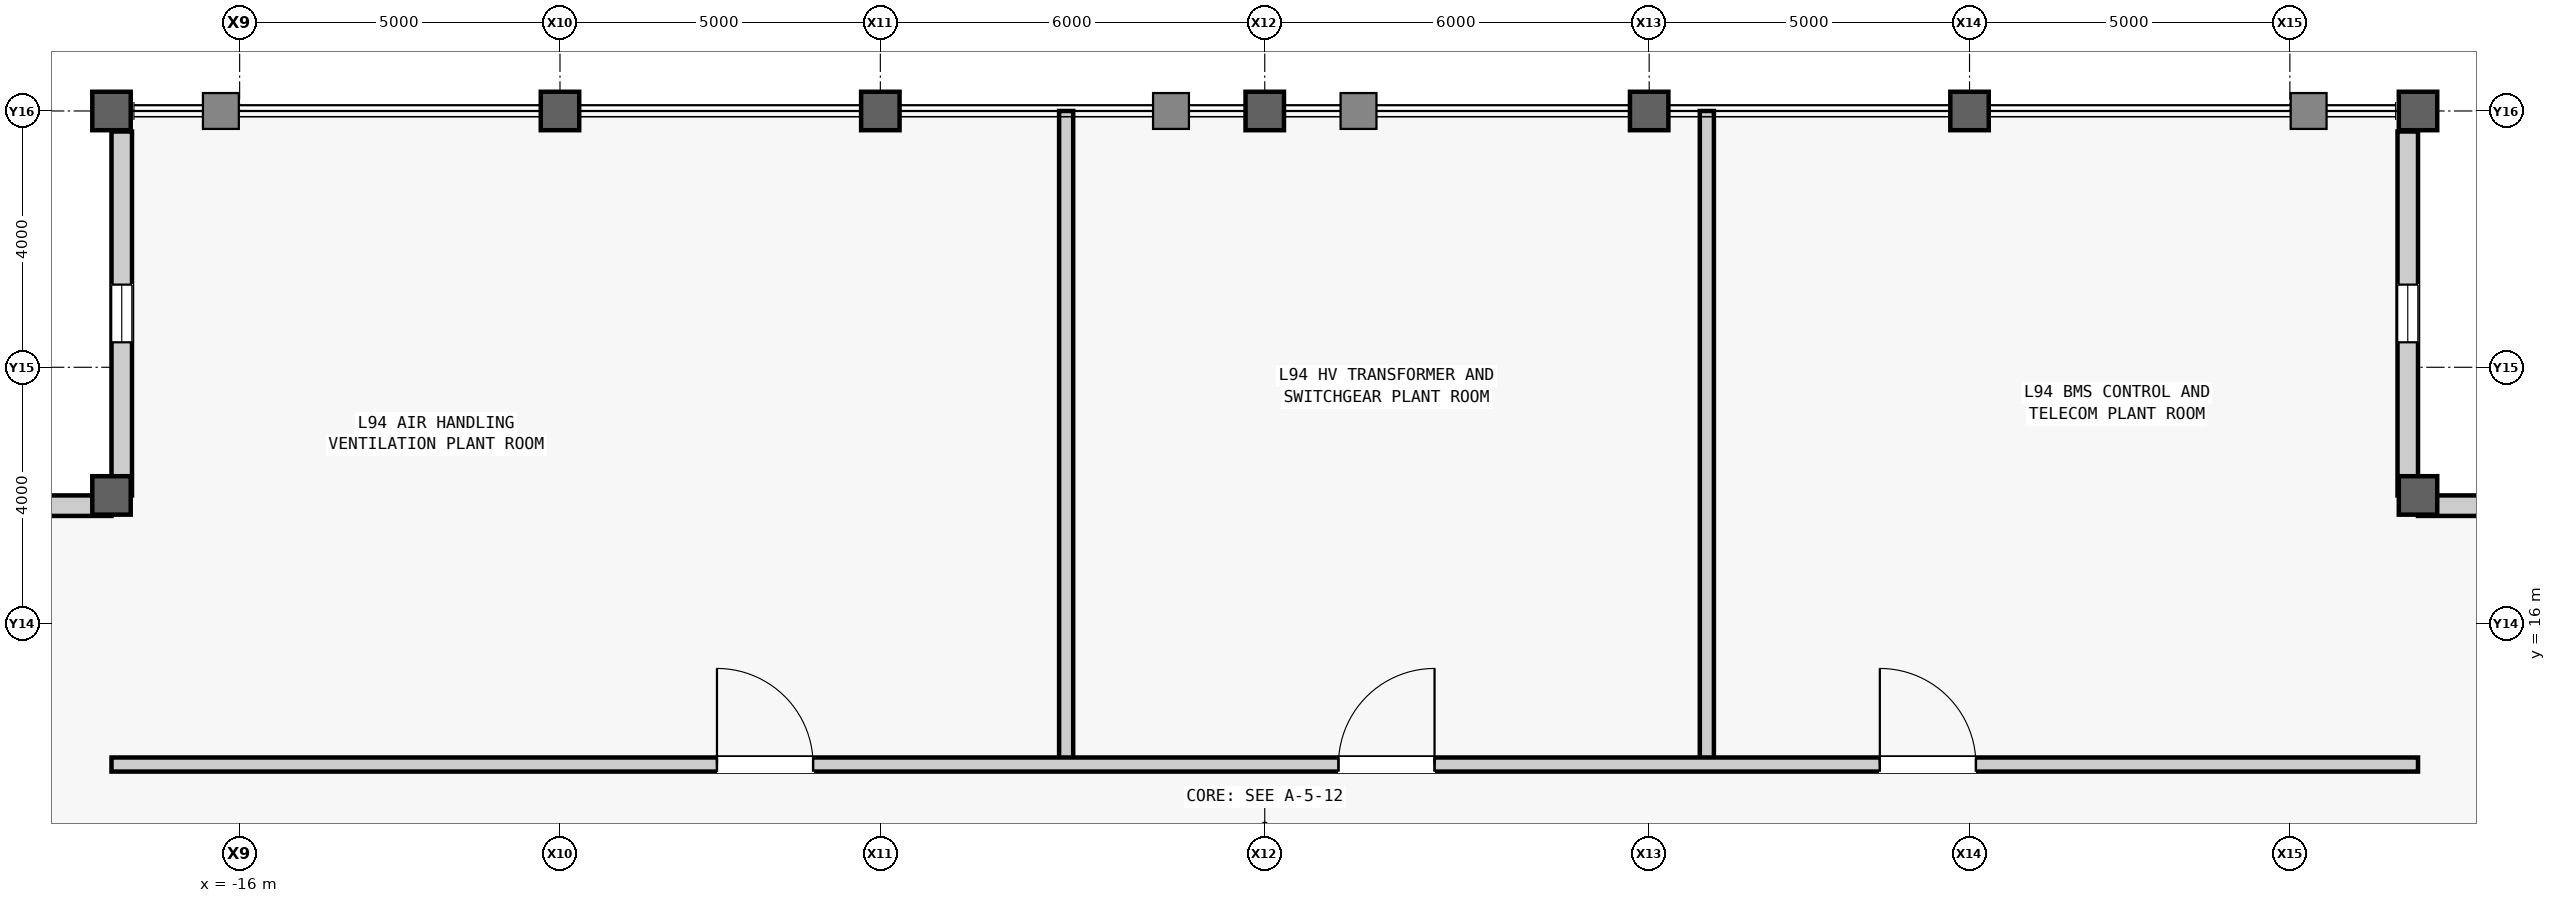
"""IFC4 building model, lengths in metres.
Left out: names, types, materials, properties, quantities, classifications, styles, units other than length and angle.
Written with IfcOpenShell. Run it as: python <this file> out.ifc"""

import sys

from ifc_helpers import new_model, si_unit, direction, frame, frame_2d, origin, origin_2d, place, context, subcontext, project, spatial, rectangle, hollow_rectangle, extrude, source, transform, mapped, element, fill, save


model = new_model("IFC4")
c1 = context("Model", 3, precision=1e-05, world=origin(), true_north=direction((0.0, 1.0)))
c2 = subcontext(c1, "Body", "Model", "MODEL_VIEW")
j1 = project(units=[si_unit("LENGTHUNIT", "METRE"), si_unit("PLANEANGLEUNIT", "RADIAN")], contexts=[c1])
p1 = place(None, origin())
s1 = spatial("IfcSite", under=j1, at=p1, CompositionType="ELEMENT")
p2 = place(p1, origin())
s2 = spatial("IfcBuilding", under=s1, at=p2, CompositionType="ELEMENT")
p3 = place(p2, frame((0.0, 0.0, 399.5)))
s3 = spatial("IfcBuildingStorey", under=s2, at=p3, CompositionType="ELEMENT", Elevation=399.5)
m1 = source(origin(), c2, "Body", "SweptSolid", [
    extrude(hollow_rectangle(XDim=0.6, YDim=0.6, WallThickness=0.035, at=origin_2d()), origin(), (0.0, 0.0, 1.0), 4.8),
])
for number, where, z_axis, x_axis in (
    (1, (-18.0, 18.0, 0.0), (0.0, 0.0, 1.0), (1.0, 0.0, 0.0)),
    (2, (-18.0, 24.0, 0.0), (0.0, 0.0, 1.0), (1.0, 0.0, 0.0)),
    (3, (-11.0, 24.0, 0.0), (0.0, 0.0, 1.0), (1.0, 0.0, 0.0)),
    (4, (-6.0, 24.0, 0.0), (0.0, 0.0, 1.0), (1.0, 0.0, 0.0)),
    (5, (0.0, 24.0, 0.0), (0.0, 0.0, 1.0), (1.0, 0.0, 0.0)),
    (6, (6.0, 24.0, 0.0), (0.0, 0.0, 1.0), (1.0, 0.0, 0.0)),
    (7, (11.0, 24.0, 0.0), (0.0, 0.0, 1.0), (1.0, 0.0, 0.0)),
    (8, (18.0, 18.0, 0.0), (0.0, 0.0, 1.0), (1.0, 0.0, 0.0)),
    (9, (18.0, 24.0, 0.0), (0.0, 0.0, 1.0), (1.0, 0.0, 0.0)),
):
    element("IfcColumn", number, at=place(p3, frame(where, z_axis=z_axis, x_axis=x_axis)), inside=s3, PredefinedType="COLUMN", context=c2, shape_type="MappedRepresentation", body=[
        mapped(m1, transform((0.0, 0.0, 0.0), scale=1.0)),
    ])
m2 = source(origin(), c2, "Body", "SweptSolid", [
    extrude(rectangle(XDim=5.68, YDim=0.32, at=frame_2d((2.84, 0.0))), origin(), (0.0, 0.0, 1.0), 3.951),
])
p4 = place(p3, frame((18.0, 17.84, 0.0), z_axis=(0.0, 0.0, 1.0), x_axis=(1.0, 0.0, 0.0)))
e10 = element("IfcWall", 10, at=p4, inside=s3, PredefinedType="STANDARD", context=c2, shape_type="MappedRepresentation", body=[
    mapped(m2, transform((0.0, 0.0, 0.0), scale=1.0)),
])
m3 = source(origin(), c2, "Body", "SweptSolid", [
    extrude(rectangle(XDim=0.9, YDim=2.4, at=frame_2d((0.45, 1.2))), frame((0.0, 0.17, 0.0), z_axis=(0.0, -1.0, 0.0), x_axis=(1.0, 0.0, 0.0)), (0.0, 0.0, 1.0), 0.34),
])
p5 = place(p4, frame((2.39, 0.0, 0.7)))
e11 = element("IfcOpeningElement", 11, at=p5, cuts=e10, PredefinedType="OPENING", context=c2, shape_type="MappedRepresentation", body=[
    mapped(m3, transform((0.0, 0.0, 0.0), scale=1.0)),
])
p6 = place(p3, frame((17.84, 18.0, 0.0), z_axis=(0.0, 0.0, 1.0), x_axis=(0.0, 1.0, 0.0)))
e12 = element("IfcWall", 12, at=p6, inside=s3, PredefinedType="STANDARD", context=c2, shape_type="MappedRepresentation", body=[
    mapped(m2, transform((0.0, 0.0, 0.0), scale=1.0)),
])
p7 = place(p6, frame((2.39, 0.0, 0.7)))
e13 = element("IfcOpeningElement", 13, at=p7, cuts=e12, PredefinedType="OPENING", context=c2, shape_type="MappedRepresentation", body=[
    mapped(m3, transform((0.0, 0.0, 0.0), scale=1.0)),
])
p8 = place(p3, frame((-17.84, 18.0, 0.0), z_axis=(0.0, 0.0, 1.0), x_axis=(0.0, 1.0, 0.0)))
e14 = element("IfcWall", 14, at=p8, inside=s3, PredefinedType="STANDARD", context=c2, shape_type="MappedRepresentation", body=[
    mapped(m2, transform((0.0, 0.0, 0.0), scale=1.0)),
])
p9 = place(p8, frame((2.39, 0.0, 0.7)))
e15 = element("IfcOpeningElement", 15, at=p9, cuts=e14, PredefinedType="OPENING", context=c2, shape_type="MappedRepresentation", body=[
    mapped(m3, transform((0.0, 0.0, 0.0), scale=1.0)),
])
p10 = place(p3, frame((-18.0, 17.84, 0.0), z_axis=(0.0, 0.0, 1.0), x_axis=(-1.0, 0.0, 0.0)))
e16 = element("IfcWall", 16, at=p10, inside=s3, PredefinedType="STANDARD", context=c2, shape_type="MappedRepresentation", body=[
    mapped(m2, transform((0.0, 0.0, 0.0), scale=1.0)),
])
p11 = place(p10, frame((2.39, 0.0, 0.7)))
e17 = element("IfcOpeningElement", 17, at=p11, cuts=e16, PredefinedType="OPENING", context=c2, shape_type="MappedRepresentation", body=[
    mapped(m3, transform((0.0, 0.0, 0.0), scale=1.0)),
])
m4 = source(origin(), c2, "Body", "SweptSolid", [
    extrude(rectangle(XDim=10.2, YDim=0.22, at=frame_2d((5.1, 0.0))), origin(), (0.0, 0.0, 1.0), 4.5),
])
for number, where, z_axis, x_axis in (
    (18, (-3.1, 13.8, 0.0), (0.0, 0.0, 1.0), (0.0, 1.0, 0.0)),
    (19, (6.9, 13.8, 0.0), (0.0, 0.0, 1.0), (0.0, 1.0, 0.0)),
):
    element("IfcWall", number, at=place(p3, frame(where, z_axis=z_axis, x_axis=x_axis)), inside=s3, PredefinedType="PARTITIONING", context=c2, shape_type="MappedRepresentation", body=[
        mapped(m4, transform((0.0, 0.0, 0.0), scale=1.0)),
    ])
m5 = source(origin(), c2, "Body", "SweptSolid", [
    extrude(rectangle(XDim=36.0, YDim=0.22, at=frame_2d((18.0, 0.0))), origin(), (0.0, 0.0, 1.0), 4.5),
])
p12 = place(p3, frame((-18.0, 13.8, 0.0), z_axis=(0.0, 0.0, 1.0), x_axis=(1.0, 0.0, 0.0)))
e20 = element("IfcWall", 20, at=p12, inside=s3, PredefinedType="PARTITIONING", context=c2, shape_type="MappedRepresentation", body=[
    mapped(m5, transform((0.0, 0.0, 0.0), scale=1.0)),
])
m6 = source(origin(), c2, "Body", "SweptSolid", [
    extrude(rectangle(XDim=1.5, YDim=2.3, at=frame_2d((0.75, 1.15))), frame((0.0, 0.12, 0.0), z_axis=(0.0, -1.0, 0.0), x_axis=(1.0, 0.0, 0.0)), (0.0, 0.0, 1.0), 0.24),
])
p13 = place(p12, frame((9.45, 0.0, 0.0)))
e21 = element("IfcOpeningElement", 21, at=p13, cuts=e20, PredefinedType="OPENING", context=c2, shape_type="MappedRepresentation", body=[
    mapped(m6, transform((0.0, 0.0, 0.0), scale=1.0)),
])
p14 = place(p12, frame((19.15, 0.0, 0.0)))
e22 = element("IfcOpeningElement", 22, at=p14, cuts=e20, PredefinedType="OPENING", context=c2, shape_type="MappedRepresentation", body=[
    mapped(m6, transform((0.0, 0.0, 0.0), scale=1.0)),
])
p15 = place(p12, frame((27.6, 0.0, 0.0)))
e23 = element("IfcOpeningElement", 23, at=p15, cuts=e20, PredefinedType="OPENING", context=c2, shape_type="MappedRepresentation", body=[
    mapped(m6, transform((0.0, 0.0, 0.0), scale=1.0)),
])
m7 = source(origin(), c2, "Body", "SweptSolid", [
    extrude(rectangle(XDim=0.9, YDim=2.4, at=frame_2d((0.45, 1.2))), frame((0.0, 0.03, 0.0), z_axis=(0.0, -1.0, 0.0), x_axis=(1.0, 0.0, 0.0)), (0.0, 0.0, 1.0), 0.06),
])
p16 = place(p7, origin())
e24 = element("IfcWindow", 24, at=p16, inside=s3, PartitioningType="SINGLE_PANEL", PredefinedType="WINDOW", context=c2, shape_type="MappedRepresentation", body=[
    mapped(m7, transform((0.0, 0.0, 0.0), scale=1.0)),
])
fill(e13, e24)
p17 = place(p9, origin())
e25 = element("IfcWindow", 25, at=p17, inside=s3, PartitioningType="SINGLE_PANEL", PredefinedType="WINDOW", context=c2, shape_type="MappedRepresentation", body=[
    mapped(m7, transform((0.0, 0.0, 0.0), scale=1.0)),
])
fill(e15, e25)
m8 = source(origin(), c2, "Body", "SweptSolid", [
    extrude(rectangle(XDim=1.5, YDim=2.3, at=frame_2d((0.75, 1.15))), frame((0.0, 0.025, 0.0), z_axis=(0.0, -1.0, 0.0), x_axis=(1.0, 0.0, 0.0)), (0.0, 0.0, 1.0), 0.05),
])
p18 = place(p13, origin())
e26 = element("IfcDoor", 26, at=p18, inside=s3, OperationType="SINGLE_SWING_LEFT", PredefinedType="DOOR", context=c2, shape_type="MappedRepresentation", body=[
    mapped(m8, transform((0.0, 0.0, 0.0), scale=1.0)),
])
fill(e21, e26)
p19 = place(p14, origin())
e27 = element("IfcDoor", 27, at=p19, inside=s3, OperationType="SINGLE_SWING_RIGHT", PredefinedType="DOOR", context=c2, shape_type="MappedRepresentation", body=[
    mapped(m8, transform((0.0, 0.0, 0.0), scale=1.0)),
])
fill(e22, e27)
p20 = place(p15, origin())
e28 = element("IfcDoor", 28, at=p20, inside=s3, OperationType="SINGLE_SWING_LEFT", PredefinedType="DOOR", context=c2, shape_type="MappedRepresentation", body=[
    mapped(m8, transform((0.0, 0.0, 0.0), scale=1.0)),
])
fill(e23, e28)
save(model, sys.argv[1])
